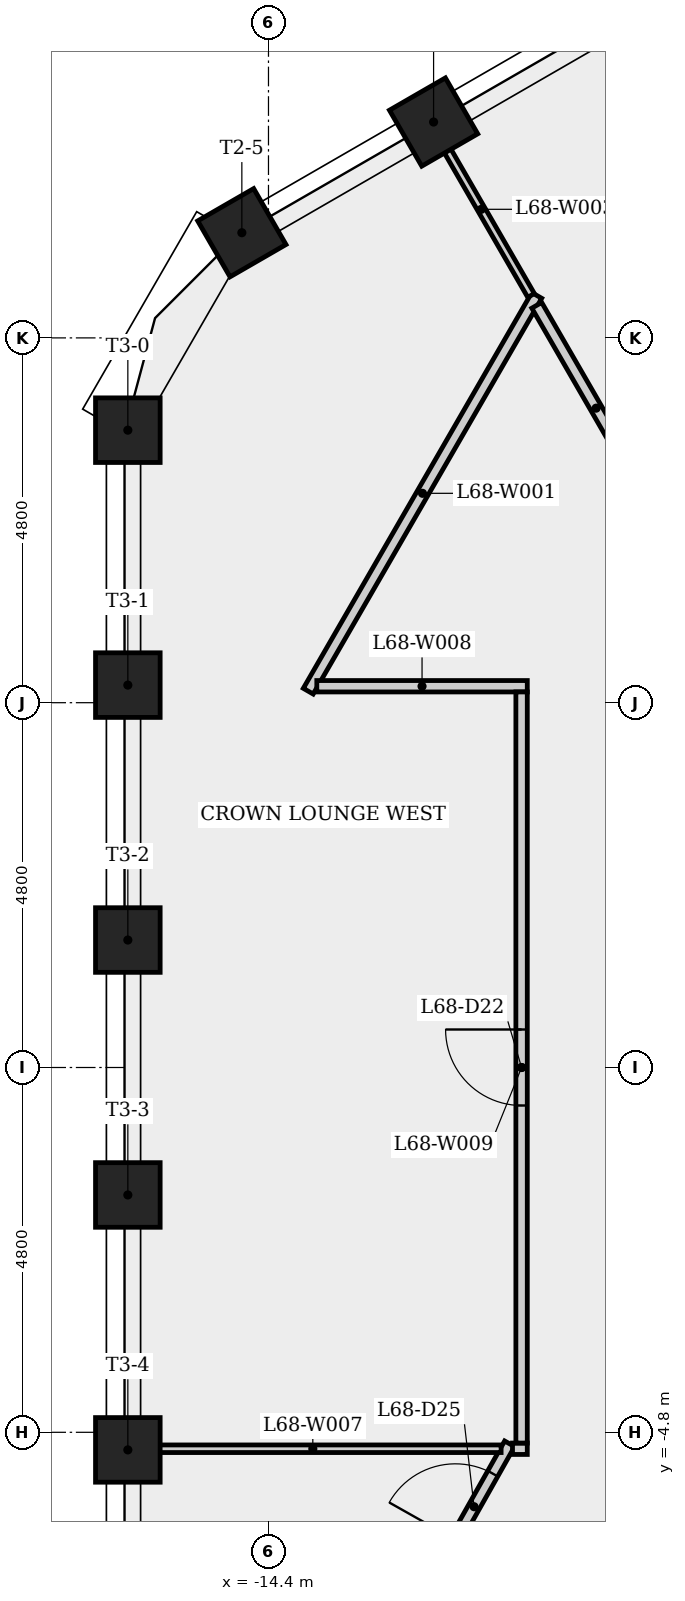
"""IFC4 building model, lengths in metres.
Left out: names, types, materials, properties, quantities, classifications, styles, units other than length and angle.
Written with IfcOpenShell. Run it as: python <this file> out.ifc"""

import sys

from ifc_helpers import new_model, si_unit, direction, frame, frame_2d, origin, origin_2d, place, context, subcontext, project, spatial, rectangle, extrude, element, fill, save


model = new_model("IFC4")
c1 = context("Model", 3, precision=1e-05, world=origin(), true_north=direction((0.0, 1.0)))
c2 = subcontext(c1, "Body", "Model", "MODEL_VIEW")
j1 = project(units=[si_unit("LENGTHUNIT", "METRE"), si_unit("PLANEANGLEUNIT", "RADIAN")], contexts=[c1])
p1 = place(None, origin())
s1 = spatial("IfcSite", under=j1, at=p1, CompositionType="ELEMENT")
p2 = place(p1, origin())
s2 = spatial("IfcBuilding", under=s1, at=p2, CompositionType="ELEMENT")
p3 = place(p2, frame((0.0, 0.0, 252.9)))
s3 = spatial("IfcBuildingStorey", under=s2, at=p3, CompositionType="ELEMENT", Elevation=252.9)
for number, where, z_axis, x_axis in (
    (1, (-9.705, 13.897, 0.0), (0.0, 0.0, 1.0), (-0.5, 0.866, 0.0)),
    (2, (-12.228, 12.44, 0.0), (0.0, 0.0, 1.0), (-0.5, 0.866, 0.0)),
    (3, (-14.75, 10.984, 0.0), (0.0, 0.0, 1.0), (-0.5, 0.866, 0.0)),
    (4, (-16.25, 8.386, 0.0), (0.0, 0.0, 1.0), (-1.0, 0.0, 0.0)),
    (5, (-16.25, 5.031, 0.0), (0.0, 0.0, 1.0), (-1.0, 0.0, 0.0)),
    (6, (-16.25, 1.677, 0.0), (0.0, 0.0, 1.0), (-1.0, 0.0, 0.0)),
    (7, (-16.25, -1.677, 0.0), (0.0, 0.0, 1.0), (-1.0, 0.0, 0.0)),
    (8, (-16.25, -5.031, 0.0), (0.0, 0.0, 1.0), (-1.0, 0.0, 0.0)),
):
    element("IfcColumn", number, at=place(p3, frame(where, z_axis=z_axis, x_axis=x_axis)), inside=s3, PredefinedType="COLUMN", context=c2, shape_type="SweptSolid", body=[
        extrude(rectangle(XDim=0.85, YDim=0.85, at=origin_2d()), origin(), (0.0, 0.0, 1.0), 5.0),
    ])
p4 = place(p3, frame((-13.877, 4.951, 0.0), z_axis=(0.0, 0.0, 1.0), x_axis=(0.49999074569, 0.866030746697, 0.0)))
e9 = element("IfcWall", 9, at=p4, inside=s3, PredefinedType="PARTITIONING", context=c2, shape_type="SweptSolid", body=[
    extrude(rectangle(XDim=6.013, YDim=0.15, at=frame_2d((3.006, 0.0))), origin(), (0.0, 0.0, 1.0), 4.6),
])
p5 = place(p3, frame((-12.254, 12.425, 0.0), z_axis=(0.0, 0.0, 1.0), x_axis=(0.49999161165, -0.866030246746, 0.0)))
e10 = element("IfcWall", 10, at=p5, inside=s3, PredefinedType="PARTITIONING", context=c2, shape_type="SweptSolid", body=[
    extrude(rectangle(XDim=2.617, YDim=0.1, at=frame_2d((1.309, 0.0))), origin(), (0.0, 0.0, 1.0), 4.6),
])
p6 = place(p3, frame((-12.111, -6.518, 0.0), z_axis=(0.0, 0.0, 1.0), x_axis=(0.491337027479, 0.87096953186, 0.0)))
e11 = element("IfcWall", 11, at=p6, inside=s3, PredefinedType="PARTITIONING", context=c2, shape_type="SweptSolid", body=[
    extrude(rectangle(XDim=1.799, YDim=0.15, at=frame_2d((0.899, 0.0))), origin(), (0.0, 0.0, 1.0), 4.6),
])
p7 = place(p6, frame((0.348, 0.0, 0.0)))
e12 = element("IfcOpeningElement", 12, at=p7, cuts=e11, PredefinedType="OPENING", context=c2, shape_type="SweptSolid", body=[
    extrude(rectangle(XDim=1.0, YDim=2.1, at=frame_2d((0.5, 1.05))), frame((0.0, 0.085, 0.0), z_axis=(0.0, -1.0, 0.0), x_axis=(1.0, 0.0, 0.0)), (0.0, 0.0, 1.0), 0.17),
])
p8 = place(p3, frame((-11.189, -5.016, 0.0), z_axis=(0.0, 0.0, 1.0), x_axis=(1.0, 0.0, 0.0)))
e13 = element("IfcWall", 13, at=p8, inside=s3, PredefinedType="PARTITIONING", context=c2, shape_type="SweptSolid", body=[
    extrude(rectangle(XDim=0.194, YDim=0.15, at=frame_2d((0.097, 0.0))), origin(), (0.0, 0.0, 1.0), 4.6),
])
p9 = place(p3, frame((-11.339, -5.016, 0.0), z_axis=(0.0, 0.0, 1.0), x_axis=(-1.0, 0.0, 0.0)))
e14 = element("IfcWall", 14, at=p9, inside=s3, PredefinedType="PARTITIONING", context=c2, shape_type="SweptSolid", body=[
    extrude(rectangle(XDim=4.955, YDim=0.1, at=frame_2d((2.477, 0.0))), origin(), (0.0, 0.0, 1.0), 4.6),
])
p10 = place(p3, frame((-10.995, 5.016, 0.0), z_axis=(0.0, 0.0, 1.0), x_axis=(-1.0, 0.0, 0.0)))
e15 = element("IfcWall", 15, at=p10, inside=s3, PredefinedType="PARTITIONING", context=c2, shape_type="SweptSolid", body=[
    extrude(rectangle(XDim=2.769, YDim=0.15, at=frame_2d((1.385, 0.0))), origin(), (0.0, 0.0, 1.0), 4.6),
])
p11 = place(p3, frame((-11.07, -4.941, 0.0), z_axis=(0.0, 0.0, 1.0), x_axis=(0.0, 1.0, 0.0)))
e16 = element("IfcWall", 16, at=p11, inside=s3, PredefinedType="PARTITIONING", context=c2, shape_type="SweptSolid", body=[
    extrude(rectangle(XDim=9.883, YDim=0.15, at=frame_2d((4.941, 0.0))), origin(), (0.0, 0.0, 1.0), 4.6),
])
p12 = place(p11, frame((4.441, 0.0, 0.0)))
e17 = element("IfcOpeningElement", 17, at=p12, cuts=e16, PredefinedType="OPENING", context=c2, shape_type="SweptSolid", body=[
    extrude(rectangle(XDim=1.0, YDim=2.1, at=frame_2d((0.5, 1.05))), frame((0.0, 0.085, 0.0), z_axis=(0.0, -1.0, 0.0), x_axis=(1.0, 0.0, 0.0)), (0.0, 0.0, 1.0), 0.17),
])
p13 = place(p3, frame((-10.87, 10.029, 0.0), z_axis=(0.0, 0.0, 1.0), x_axis=(0.499995170647, -0.866028191995, 0.0)))
e18 = element("IfcWall", 18, at=p13, inside=s3, PredefinedType="PARTITIONING", context=c2, shape_type="SweptSolid", body=[
    extrude(rectangle(XDim=3.125, YDim=0.15, at=frame_2d((1.563, 0.0))), origin(), (0.0, 0.0, 1.0), 4.6),
])
p14 = place(p12, origin())
e19 = element("IfcDoor", 19, at=p14, inside=s3, OperationType="SINGLE_SWING_RIGHT", PredefinedType="DOOR", context=c2, shape_type="SweptSolid", body=[
    extrude(rectangle(XDim=1.0, YDim=2.1, at=frame_2d((0.5, 1.05))), frame((0.0, 0.025, 0.0), z_axis=(0.0, -1.0, 0.0), x_axis=(1.0, 0.0, 0.0)), (0.0, 0.0, 1.0), 0.05),
])
fill(e17, e19)
p15 = place(p7, origin())
e20 = element("IfcDoor", 20, at=p15, inside=s3, OperationType="SINGLE_SWING_LEFT", PredefinedType="DOOR", context=c2, shape_type="SweptSolid", body=[
    extrude(rectangle(XDim=1.0, YDim=2.1, at=frame_2d((0.5, 1.05))), frame((0.0, 0.025, 0.0), z_axis=(0.0, -1.0, 0.0), x_axis=(1.0, 0.0, 0.0)), (0.0, 0.0, 1.0), 0.05),
])
fill(e12, e20)
save(model, sys.argv[1])
